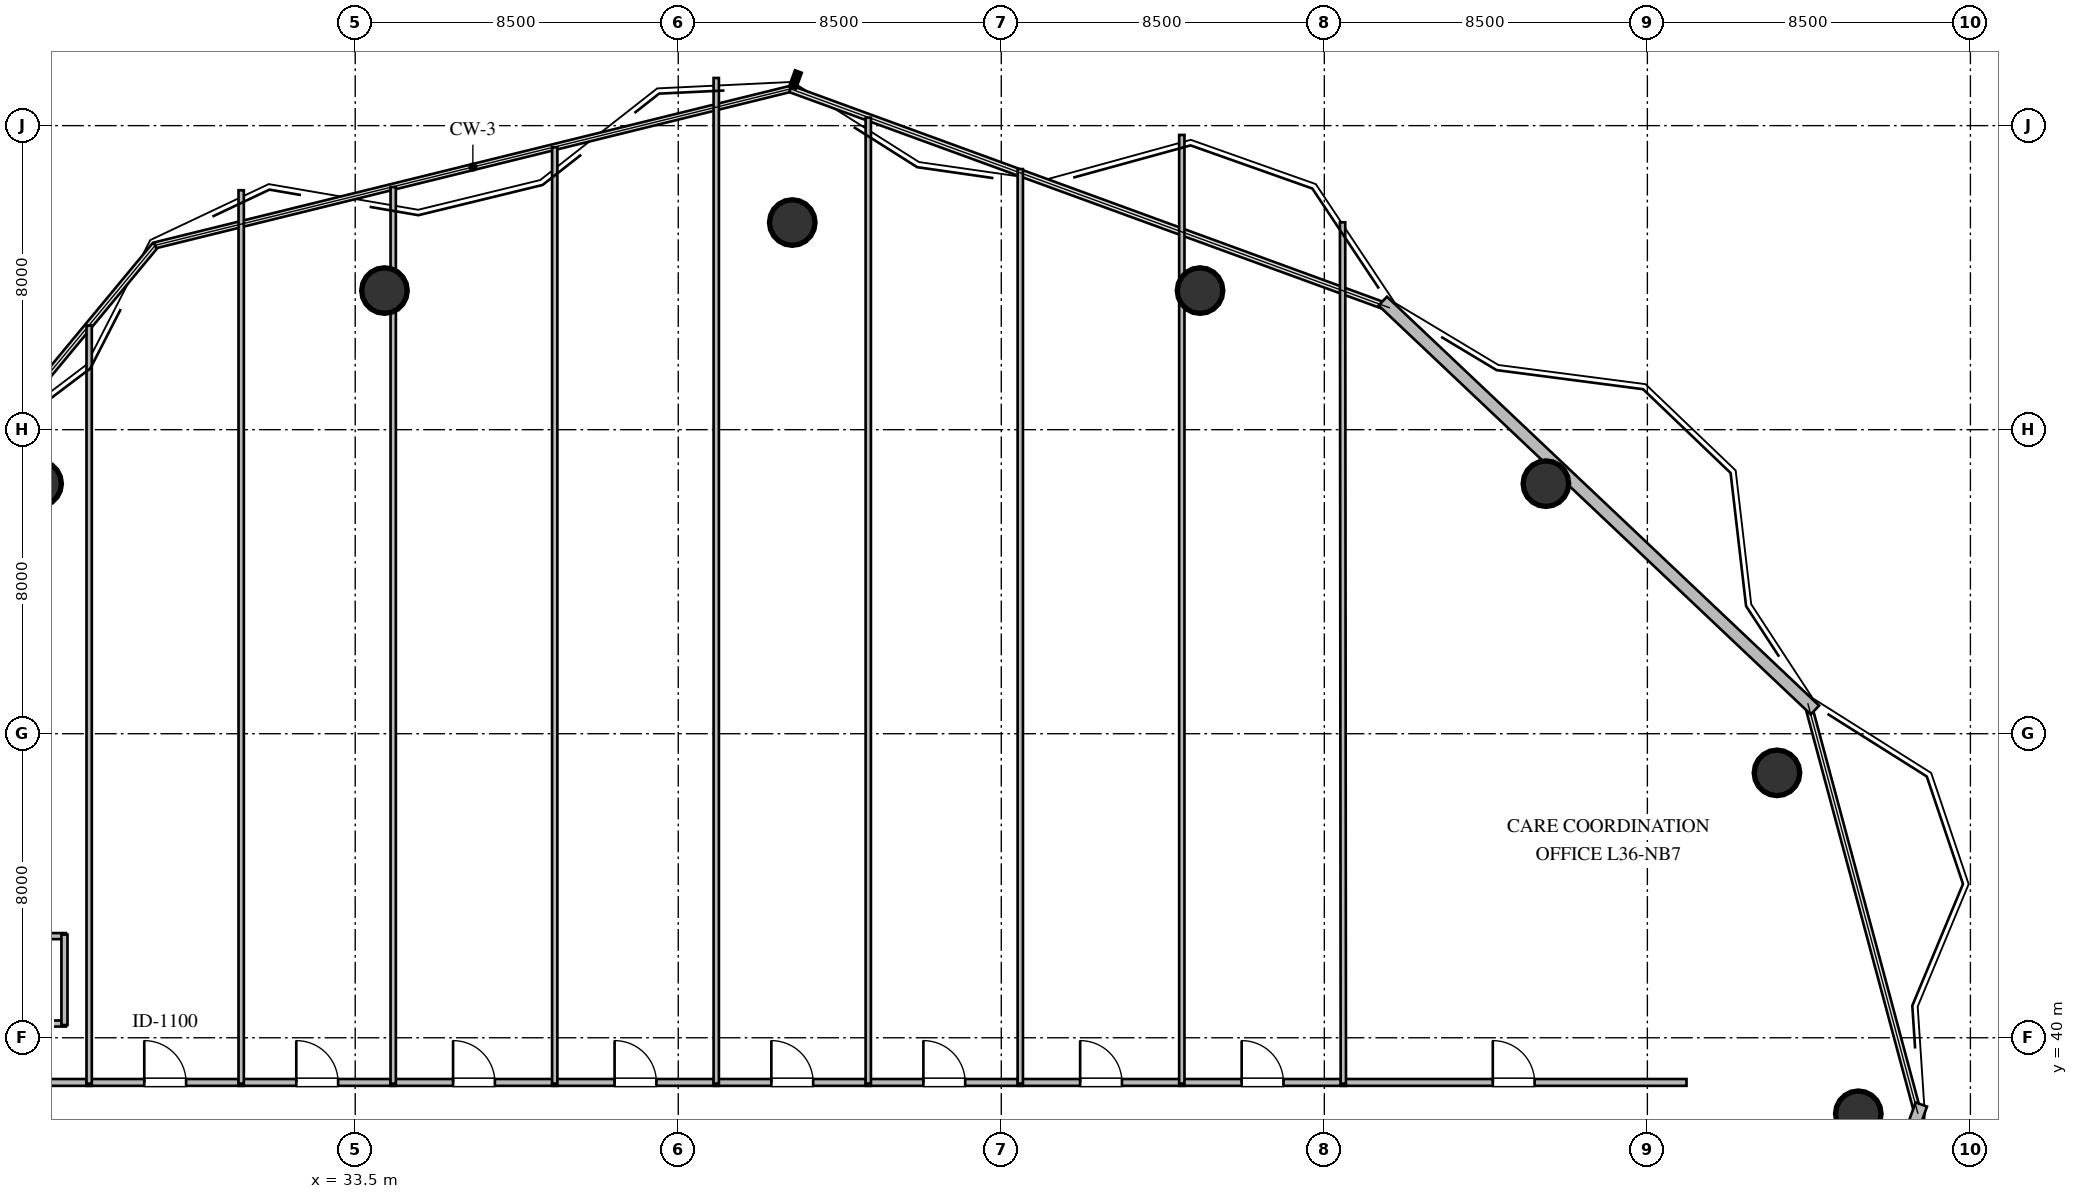
"""IFC4 building model, lengths in metres.
Left out: names, types, materials, properties, quantities, classifications, styles, units other than length and angle.
Written with IfcOpenShell. Run it as: python <this file> out.ifc"""

import sys

from ifc_helpers import new_model, si_unit, direction, frame, frame_2d, origin, origin_2d, place, context, subcontext, project, spatial, rectangle, circle, extrude, element, fill, save


model = new_model("IFC4")
c1 = context("Model", 3, precision=1e-05, world=origin(), true_north=direction((0.0, 1.0)))
c2 = subcontext(c1, "Body", "Model", "MODEL_VIEW")
j1 = project(units=[si_unit("LENGTHUNIT", "METRE"), si_unit("PLANEANGLEUNIT", "RADIAN")], contexts=[c1])
p1 = place(None, origin())
s1 = spatial("IfcSite", under=j1, at=p1, CompositionType="ELEMENT")
p2 = place(p1, origin())
s2 = spatial("IfcBuilding", under=s1, at=p2, CompositionType="ELEMENT")
p3 = place(p2, frame((0.0, 0.0, 138.6)))
s3 = spatial("IfcBuildingStorey", under=s2, at=p3, CompositionType="ELEMENT", Elevation=138.6)
for number, where, z_axis, x_axis in (
    (1, (73.05, 38.0, 0.0), (0.0, 0.0, 1.0), (1.0, 0.0, 0.0)),
    (2, (70.91, 46.97, 0.0), (0.0, 0.0, 1.0), (1.0, 0.0, 0.0)),
    (3, (64.83, 54.58, 0.0), (0.0, 0.0, 1.0), (1.0, 0.0, 0.0)),
    (4, (55.73, 59.66, 0.0), (0.0, 0.0, 1.0), (1.0, 0.0, 0.0)),
    (5, (45.0, 61.45, 0.0), (0.0, 0.0, 1.0), (1.0, 0.0, 0.0)),
    (6, (34.27, 59.66, 0.0), (0.0, 0.0, 1.0), (1.0, 0.0, 0.0)),
    (7, (25.17, 54.58, 0.0), (0.0, 0.0, 1.0), (1.0, 0.0, 0.0)),
):
    element("IfcColumn", number, at=place(p3, frame(where, z_axis=z_axis, x_axis=x_axis)), inside=s3, PredefinedType="COLUMN", context=c2, shape_type="SweptSolid", body=[
        extrude(circle(Radius=0.6, at=origin_2d()), origin(), (0.0, 0.0, 1.0), 3.6),
    ])
p4 = place(p3, frame((74.708, 38.244, 0.0), z_axis=(0.0, 0.0, 1.0), x_axis=(-0.340324669139, -0.94030799187, 0.0)))
e8 = element("IfcWall", 8, at=p4, inside=s3, PredefinedType="STANDARD", context=c2, shape_type="SweptSolid", body=[
    extrude(rectangle(XDim=13.81, YDim=0.32, at=frame_2d((6.905, 0.0))), origin(), (0.0, 0.0, 1.0), 3.36),
])
p5 = place(p3, frame((60.538, 59.383, 0.0), z_axis=(0.0, 0.0, 1.0), x_axis=(0.726378346584, -0.687295058628, 0.0)))
e9 = element("IfcWall", 9, at=p5, inside=s3, PredefinedType="STANDARD", context=c2, shape_type="SweptSolid", body=[
    extrude(rectangle(XDim=15.654, YDim=0.32, at=frame_2d((7.827, 0.0))), origin(), (0.0, 0.0, 1.0), 3.36),
])
p6 = place(p3, frame((23.51, 40.375, 0.0), z_axis=(0.0, 0.0, 1.0), x_axis=(1.0, 0.0, 0.0)))
e10 = element("IfcWall", 10, at=p6, inside=s3, PredefinedType="PLUMBINGWALL", context=c2, shape_type="SweptSolid", body=[
    extrude(rectangle(XDim=2.38, YDim=0.16, at=frame_2d((1.19, 0.0))), origin(), (0.0, 0.0, 1.0), 3.36),
])
p7 = place(p3, frame((23.51, 42.675, 0.0), z_axis=(0.0, 0.0, 1.0), x_axis=(1.0, 0.0, 0.0)))
e11 = element("IfcWall", 11, at=p7, inside=s3, PredefinedType="PLUMBINGWALL", context=c2, shape_type="SweptSolid", body=[
    extrude(rectangle(XDim=2.38, YDim=0.16, at=frame_2d((1.19, 0.0))), origin(), (0.0, 0.0, 1.0), 3.36),
])
p8 = place(p7, frame((0.74, 0.0, 0.0)))
e12 = element("IfcOpeningElement", 12, at=p8, cuts=e11, PredefinedType="OPENING", context=c2, shape_type="SweptSolid", body=[
    extrude(rectangle(XDim=0.92, YDim=2.1, at=frame_2d((0.46, 1.05))), frame((0.0, 0.09, 0.0), z_axis=(0.0, -1.0, 0.0), x_axis=(1.0, 0.0, 0.0)), (0.0, 0.0, 1.0), 0.18),
])
p9 = place(p3, frame((25.85, 40.335, 0.0), z_axis=(0.0, 0.0, 1.0), x_axis=(0.0, 1.0, 0.0)))
e13 = element("IfcWall", 13, at=p9, inside=s3, PredefinedType="PLUMBINGWALL", context=c2, shape_type="SweptSolid", body=[
    extrude(rectangle(XDim=2.38, YDim=0.16, at=frame_2d((1.19, 0.0))), origin(), (0.0, 0.0, 1.0), 3.36),
])
p10 = place(p3, frame((22.685, 38.825, 0.0), z_axis=(0.0, 0.0, 1.0), x_axis=(1.0, 0.0, 0.0)))
e14 = element("IfcWall", 14, at=p10, inside=s3, PredefinedType="PARTITIONING", context=c2, shape_type="SweptSolid", body=[
    extrude(rectangle(XDim=3.88, YDim=0.18, at=frame_2d((1.94, 0.0))), origin(), (0.0, 0.0, 1.0), 3.36),
])
p11 = place(p10, frame((1.39, 0.0, 0.0)))
e15 = element("IfcOpeningElement", 15, at=p11, cuts=e14, PredefinedType="OPENING", context=c2, shape_type="SweptSolid", body=[
    extrude(rectangle(XDim=1.1, YDim=2.1, at=frame_2d((0.55, 1.05))), frame((0.0, 0.1, 0.0), z_axis=(0.0, -1.0, 0.0), x_axis=(1.0, 0.0, 0.0)), (0.0, 0.0, 1.0), 0.2),
])
p12 = place(p3, frame((26.435, 38.825, 0.0), z_axis=(0.0, 0.0, 1.0), x_axis=(1.0, 0.0, 0.0)))
e16 = element("IfcWall", 16, at=p12, inside=s3, PredefinedType="PARTITIONING", context=c2, shape_type="SweptSolid", body=[
    extrude(rectangle(XDim=4.13, YDim=0.18, at=frame_2d((2.065, 0.0))), origin(), (0.0, 0.0, 1.0), 3.36),
])
p13 = place(p12, frame((1.515, 0.0, 0.0)))
e17 = element("IfcOpeningElement", 17, at=p13, cuts=e16, PredefinedType="OPENING", context=c2, shape_type="SweptSolid", body=[
    extrude(rectangle(XDim=1.1, YDim=2.1, at=frame_2d((0.55, 1.05))), frame((0.0, 0.1, 0.0), z_axis=(0.0, -1.0, 0.0), x_axis=(1.0, 0.0, 0.0)), (0.0, 0.0, 1.0), 0.2),
])
p14 = place(p3, frame((30.435, 38.825, 0.0), z_axis=(0.0, 0.0, 1.0), x_axis=(1.0, 0.0, 0.0)))
e18 = element("IfcWall", 18, at=p14, inside=s3, PredefinedType="PARTITIONING", context=c2, shape_type="SweptSolid", body=[
    extrude(rectangle(XDim=4.13, YDim=0.18, at=frame_2d((2.065, 0.0))), origin(), (0.0, 0.0, 1.0), 3.36),
])
p15 = place(p14, frame((1.515, 0.0, 0.0)))
e19 = element("IfcOpeningElement", 19, at=p15, cuts=e18, PredefinedType="OPENING", context=c2, shape_type="SweptSolid", body=[
    extrude(rectangle(XDim=1.1, YDim=2.1, at=frame_2d((0.55, 1.05))), frame((0.0, 0.1, 0.0), z_axis=(0.0, -1.0, 0.0), x_axis=(1.0, 0.0, 0.0)), (0.0, 0.0, 1.0), 0.2),
])
p16 = place(p3, frame((34.435, 38.825, 0.0), z_axis=(0.0, 0.0, 1.0), x_axis=(1.0, 0.0, 0.0)))
e20 = element("IfcWall", 20, at=p16, inside=s3, PredefinedType="PARTITIONING", context=c2, shape_type="SweptSolid", body=[
    extrude(rectangle(XDim=4.38, YDim=0.18, at=frame_2d((2.19, 0.0))), origin(), (0.0, 0.0, 1.0), 3.36),
])
p17 = place(p16, frame((1.64, 0.0, 0.0)))
e21 = element("IfcOpeningElement", 21, at=p17, cuts=e20, PredefinedType="OPENING", context=c2, shape_type="SweptSolid", body=[
    extrude(rectangle(XDim=1.1, YDim=2.1, at=frame_2d((0.55, 1.05))), frame((0.0, 0.1, 0.0), z_axis=(0.0, -1.0, 0.0), x_axis=(1.0, 0.0, 0.0)), (0.0, 0.0, 1.0), 0.2),
])
p18 = place(p3, frame((38.685, 38.825, 0.0), z_axis=(0.0, 0.0, 1.0), x_axis=(1.0, 0.0, 0.0)))
e22 = element("IfcWall", 22, at=p18, inside=s3, PredefinedType="PARTITIONING", context=c2, shape_type="SweptSolid", body=[
    extrude(rectangle(XDim=4.38, YDim=0.18, at=frame_2d((2.19, 0.0))), origin(), (0.0, 0.0, 1.0), 3.36),
])
p19 = place(p18, frame((1.64, 0.0, 0.0)))
e23 = element("IfcOpeningElement", 23, at=p19, cuts=e22, PredefinedType="OPENING", context=c2, shape_type="SweptSolid", body=[
    extrude(rectangle(XDim=1.1, YDim=2.1, at=frame_2d((0.55, 1.05))), frame((0.0, 0.1, 0.0), z_axis=(0.0, -1.0, 0.0), x_axis=(1.0, 0.0, 0.0)), (0.0, 0.0, 1.0), 0.2),
])
p20 = place(p3, frame((42.935, 38.825, 0.0), z_axis=(0.0, 0.0, 1.0), x_axis=(1.0, 0.0, 0.0)))
e24 = element("IfcWall", 24, at=p20, inside=s3, PredefinedType="PARTITIONING", context=c2, shape_type="SweptSolid", body=[
    extrude(rectangle(XDim=4.13, YDim=0.18, at=frame_2d((2.065, 0.0))), origin(), (0.0, 0.0, 1.0), 3.36),
])
p21 = place(p20, frame((1.515, 0.0, 0.0)))
e25 = element("IfcOpeningElement", 25, at=p21, cuts=e24, PredefinedType="OPENING", context=c2, shape_type="SweptSolid", body=[
    extrude(rectangle(XDim=1.1, YDim=2.1, at=frame_2d((0.55, 1.05))), frame((0.0, 0.1, 0.0), z_axis=(0.0, -1.0, 0.0), x_axis=(1.0, 0.0, 0.0)), (0.0, 0.0, 1.0), 0.2),
])
p22 = place(p3, frame((46.935, 38.825, 0.0), z_axis=(0.0, 0.0, 1.0), x_axis=(1.0, 0.0, 0.0)))
e26 = element("IfcWall", 26, at=p22, inside=s3, PredefinedType="PARTITIONING", context=c2, shape_type="SweptSolid", body=[
    extrude(rectangle(XDim=4.13, YDim=0.18, at=frame_2d((2.065, 0.0))), origin(), (0.0, 0.0, 1.0), 3.36),
])
p23 = place(p22, frame((1.515, 0.0, 0.0)))
e27 = element("IfcOpeningElement", 27, at=p23, cuts=e26, PredefinedType="OPENING", context=c2, shape_type="SweptSolid", body=[
    extrude(rectangle(XDim=1.1, YDim=2.1, at=frame_2d((0.55, 1.05))), frame((0.0, 0.1, 0.0), z_axis=(0.0, -1.0, 0.0), x_axis=(1.0, 0.0, 0.0)), (0.0, 0.0, 1.0), 0.2),
])
p24 = place(p3, frame((50.935, 38.825, 0.0), z_axis=(0.0, 0.0, 1.0), x_axis=(1.0, 0.0, 0.0)))
e28 = element("IfcWall", 28, at=p24, inside=s3, PredefinedType="PARTITIONING", context=c2, shape_type="SweptSolid", body=[
    extrude(rectangle(XDim=4.38, YDim=0.18, at=frame_2d((2.19, 0.0))), origin(), (0.0, 0.0, 1.0), 3.36),
])
p25 = place(p24, frame((1.64, 0.0, 0.0)))
e29 = element("IfcOpeningElement", 29, at=p25, cuts=e28, PredefinedType="OPENING", context=c2, shape_type="SweptSolid", body=[
    extrude(rectangle(XDim=1.1, YDim=2.1, at=frame_2d((0.55, 1.05))), frame((0.0, 0.1, 0.0), z_axis=(0.0, -1.0, 0.0), x_axis=(1.0, 0.0, 0.0)), (0.0, 0.0, 1.0), 0.2),
])
p26 = place(p3, frame((55.185, 38.825, 0.0), z_axis=(0.0, 0.0, 1.0), x_axis=(1.0, 0.0, 0.0)))
e30 = element("IfcWall", 30, at=p26, inside=s3, PredefinedType="PARTITIONING", context=c2, shape_type="SweptSolid", body=[
    extrude(rectangle(XDim=4.38, YDim=0.18, at=frame_2d((2.19, 0.0))), origin(), (0.0, 0.0, 1.0), 3.36),
])
p27 = place(p26, frame((1.64, 0.0, 0.0)))
e31 = element("IfcOpeningElement", 31, at=p27, cuts=e30, PredefinedType="OPENING", context=c2, shape_type="SweptSolid", body=[
    extrude(rectangle(XDim=1.1, YDim=2.1, at=frame_2d((0.55, 1.05))), frame((0.0, 0.1, 0.0), z_axis=(0.0, -1.0, 0.0), x_axis=(1.0, 0.0, 0.0)), (0.0, 0.0, 1.0), 0.2),
])
p28 = place(p3, frame((59.435, 38.825, 0.0), z_axis=(0.0, 0.0, 1.0), x_axis=(1.0, 0.0, 0.0)))
e32 = element("IfcWall", 32, at=p28, inside=s3, PredefinedType="PARTITIONING", context=c2, shape_type="SweptSolid", body=[
    extrude(rectangle(XDim=9.095, YDim=0.18, at=frame_2d((4.547, 0.0))), origin(), (0.0, 0.0, 1.0), 3.36),
])
p29 = place(p28, frame((3.998, 0.0, 0.0)))
e33 = element("IfcOpeningElement", 33, at=p29, cuts=e32, PredefinedType="OPENING", context=c2, shape_type="SweptSolid", body=[
    extrude(rectangle(XDim=1.1, YDim=2.1, at=frame_2d((0.55, 1.05))), frame((0.0, 0.1, 0.0), z_axis=(0.0, -1.0, 0.0), x_axis=(1.0, 0.0, 0.0)), (0.0, 0.0, 1.0), 0.2),
])
p30 = place(p3, frame((26.5, 58.742, 0.0), z_axis=(0.0, 0.0, 1.0), x_axis=(0.0, -1.0, 0.0)))
e34 = element("IfcWall", 34, at=p30, inside=s3, PredefinedType="PARTITIONING", context=c2, shape_type="SweptSolid", body=[
    extrude(rectangle(XDim=19.947, YDim=0.14, at=frame_2d((9.973, 0.0))), origin(), (0.0, 0.0, 1.0), 3.36),
])
p31 = place(p3, frame((30.5, 62.3, 0.0), z_axis=(0.0, 0.0, 1.0), x_axis=(0.0, -1.0, 0.0)))
e35 = element("IfcWall", 35, at=p31, inside=s3, PredefinedType="PARTITIONING", context=c2, shape_type="SweptSolid", body=[
    extrude(rectangle(XDim=23.505, YDim=0.14, at=frame_2d((11.752, 0.0))), origin(), (0.0, 0.0, 1.0), 3.36),
])
p32 = place(p3, frame((34.5, 62.383, 0.0), z_axis=(0.0, 0.0, 1.0), x_axis=(0.0, -1.0, 0.0)))
e36 = element("IfcWall", 36, at=p32, inside=s3, PredefinedType="PARTITIONING", context=c2, shape_type="SweptSolid", body=[
    extrude(rectangle(XDim=23.588, YDim=0.14, at=frame_2d((11.794, 0.0))), origin(), (0.0, 0.0, 1.0), 2.806),
])
p33 = place(p3, frame((38.75, 63.43, 0.0), z_axis=(0.0, 0.0, 1.0), x_axis=(0.0, -1.0, 0.0)))
e37 = element("IfcWall", 37, at=p33, inside=s3, PredefinedType="PARTITIONING", context=c2, shape_type="SweptSolid", body=[
    extrude(rectangle(XDim=24.635, YDim=0.14, at=frame_2d((12.317, 0.0))), origin(), (0.0, 0.0, 1.0), 3.36),
])
p34 = place(p3, frame((43.0, 65.254, 0.0), z_axis=(0.0, 0.0, 1.0), x_axis=(0.0, -1.0, 0.0)))
e38 = element("IfcWall", 38, at=p34, inside=s3, PredefinedType="PARTITIONING", context=c2, shape_type="SweptSolid", body=[
    extrude(rectangle(XDim=26.459, YDim=0.14, at=frame_2d((13.229, 0.0))), origin(), (0.0, 0.0, 1.0), 3.36),
])
p35 = place(p3, frame((47.0, 64.209, 0.0), z_axis=(0.0, 0.0, 1.0), x_axis=(0.0, -1.0, 0.0)))
e39 = element("IfcWall", 39, at=p35, inside=s3, PredefinedType="PARTITIONING", context=c2, shape_type="SweptSolid", body=[
    extrude(rectangle(XDim=25.414, YDim=0.14, at=frame_2d((12.707, 0.0))), origin(), (0.0, 0.0, 1.0), 3.36),
])
p36 = place(p3, frame((51.0, 62.857, 0.0), z_axis=(0.0, 0.0, 1.0), x_axis=(0.0, -1.0, 0.0)))
e40 = element("IfcWall", 40, at=p36, inside=s3, PredefinedType="PARTITIONING", context=c2, shape_type="SweptSolid", body=[
    extrude(rectangle(XDim=24.062, YDim=0.14, at=frame_2d((12.031, 0.0))), origin(), (0.0, 0.0, 1.0), 3.36),
])
p37 = place(p3, frame((55.25, 63.755, 0.0), z_axis=(0.0, 0.0, 1.0), x_axis=(0.0, -1.0, 0.0)))
e41 = element("IfcWall", 41, at=p37, inside=s3, PredefinedType="PARTITIONING", context=c2, shape_type="SweptSolid", body=[
    extrude(rectangle(XDim=24.96, YDim=0.14, at=frame_2d((12.48, 0.0))), origin(), (0.0, 0.0, 1.0), 3.36),
])
p38 = place(p3, frame((59.48, 61.457, 0.0), z_axis=(0.0, 0.0, 1.0), x_axis=(0.000883391881, -0.999999609809, 0.0)))
e42 = element("IfcWall", 42, at=p38, inside=s3, PredefinedType="PARTITIONING", context=c2, shape_type="SweptSolid", body=[
    extrude(rectangle(XDim=22.662, YDim=0.14, at=frame_2d((11.331, 0.0))), origin(), (0.0, 0.0, 1.0), 2.996),
])
p39 = place(p13, origin())
e43 = element("IfcDoor", 43, at=p39, inside=s3, OperationType="SINGLE_SWING_LEFT", PredefinedType="DOOR", context=c2, shape_type="SweptSolid", body=[
    extrude(rectangle(XDim=1.1, YDim=2.1, at=frame_2d((0.55, 1.05))), frame((0.0, 0.025, 0.0), z_axis=(0.0, -1.0, 0.0), x_axis=(1.0, 0.0, 0.0)), (0.0, 0.0, 1.0), 0.05),
])
fill(e17, e43)
p40 = place(p15, origin())
e44 = element("IfcDoor", 44, at=p40, inside=s3, OperationType="SINGLE_SWING_LEFT", PredefinedType="DOOR", context=c2, shape_type="SweptSolid", body=[
    extrude(rectangle(XDim=1.1, YDim=2.1, at=frame_2d((0.55, 1.05))), frame((0.0, 0.025, 0.0), z_axis=(0.0, -1.0, 0.0), x_axis=(1.0, 0.0, 0.0)), (0.0, 0.0, 1.0), 0.05),
])
fill(e19, e44)
p41 = place(p17, origin())
e45 = element("IfcDoor", 45, at=p41, inside=s3, OperationType="SINGLE_SWING_LEFT", PredefinedType="DOOR", context=c2, shape_type="SweptSolid", body=[
    extrude(rectangle(XDim=1.1, YDim=2.1, at=frame_2d((0.55, 1.05))), frame((0.0, 0.025, 0.0), z_axis=(0.0, -1.0, 0.0), x_axis=(1.0, 0.0, 0.0)), (0.0, 0.0, 1.0), 0.05),
])
fill(e21, e45)
p42 = place(p19, origin())
e46 = element("IfcDoor", 46, at=p42, inside=s3, OperationType="SINGLE_SWING_LEFT", PredefinedType="DOOR", context=c2, shape_type="SweptSolid", body=[
    extrude(rectangle(XDim=1.1, YDim=2.1, at=frame_2d((0.55, 1.05))), frame((0.0, 0.025, 0.0), z_axis=(0.0, -1.0, 0.0), x_axis=(1.0, 0.0, 0.0)), (0.0, 0.0, 1.0), 0.05),
])
fill(e23, e46)
p43 = place(p21, origin())
e47 = element("IfcDoor", 47, at=p43, inside=s3, OperationType="SINGLE_SWING_LEFT", PredefinedType="DOOR", context=c2, shape_type="SweptSolid", body=[
    extrude(rectangle(XDim=1.1, YDim=2.1, at=frame_2d((0.55, 1.05))), frame((0.0, 0.025, 0.0), z_axis=(0.0, -1.0, 0.0), x_axis=(1.0, 0.0, 0.0)), (0.0, 0.0, 1.0), 0.05),
])
fill(e25, e47)
p44 = place(p23, origin())
e48 = element("IfcDoor", 48, at=p44, inside=s3, OperationType="SINGLE_SWING_LEFT", PredefinedType="DOOR", context=c2, shape_type="SweptSolid", body=[
    extrude(rectangle(XDim=1.1, YDim=2.1, at=frame_2d((0.55, 1.05))), frame((0.0, 0.025, 0.0), z_axis=(0.0, -1.0, 0.0), x_axis=(1.0, 0.0, 0.0)), (0.0, 0.0, 1.0), 0.05),
])
fill(e27, e48)
p45 = place(p25, origin())
e49 = element("IfcDoor", 49, at=p45, inside=s3, OperationType="SINGLE_SWING_LEFT", PredefinedType="DOOR", context=c2, shape_type="SweptSolid", body=[
    extrude(rectangle(XDim=1.1, YDim=2.1, at=frame_2d((0.55, 1.05))), frame((0.0, 0.025, 0.0), z_axis=(0.0, -1.0, 0.0), x_axis=(1.0, 0.0, 0.0)), (0.0, 0.0, 1.0), 0.05),
])
fill(e29, e49)
p46 = place(p27, origin())
e50 = element("IfcDoor", 50, at=p46, inside=s3, OperationType="SINGLE_SWING_LEFT", PredefinedType="DOOR", context=c2, shape_type="SweptSolid", body=[
    extrude(rectangle(XDim=1.1, YDim=2.1, at=frame_2d((0.55, 1.05))), frame((0.0, 0.025, 0.0), z_axis=(0.0, -1.0, 0.0), x_axis=(1.0, 0.0, 0.0)), (0.0, 0.0, 1.0), 0.05),
])
fill(e31, e50)
p47 = place(p29, origin())
e51 = element("IfcDoor", 51, at=p47, inside=s3, OperationType="SINGLE_SWING_LEFT", PredefinedType="DOOR", context=c2, shape_type="SweptSolid", body=[
    extrude(rectangle(XDim=1.1, YDim=2.1, at=frame_2d((0.55, 1.05))), frame((0.0, 0.025, 0.0), z_axis=(0.0, -1.0, 0.0), x_axis=(1.0, 0.0, 0.0)), (0.0, 0.0, 1.0), 0.05),
])
fill(e33, e51)
save(model, sys.argv[1])
